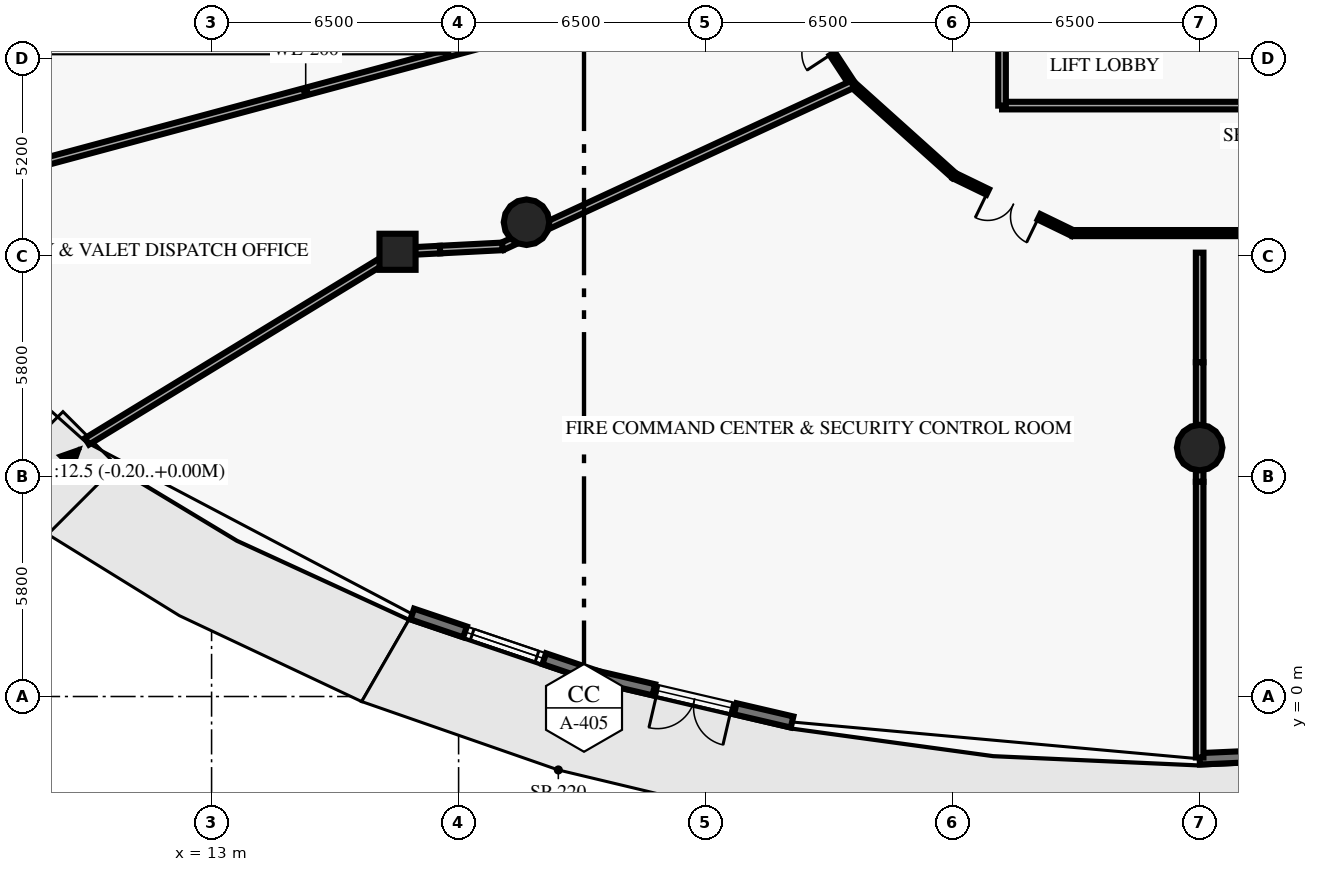
"""IFC4 building model, lengths in metres.
Left out: names, types, materials, properties, quantities, classifications, styles, units other than length and angle.
Written with IfcOpenShell. Run it as: python <this file> out.ifc"""

import sys

from ifc_helpers import new_model, si_unit, direction, frame, frame_2d, origin, origin_2d, place, context, subcontext, project, spatial, rectangle, circle, extrude, element, fill, save


model = new_model("IFC4")
c1 = context("Model", 3, precision=1e-05, world=origin(), true_north=direction((0.0, 1.0)))
c2 = subcontext(c1, "Body", "Model", "MODEL_VIEW")
j1 = project(units=[si_unit("LENGTHUNIT", "METRE"), si_unit("PLANEANGLEUNIT", "RADIAN")], contexts=[c1])
p1 = place(None, origin())
s1 = spatial("IfcSite", under=j1, at=p1, CompositionType="ELEMENT")
p2 = place(p1, origin())
s2 = spatial("IfcBuilding", under=s1, at=p2, CompositionType="ELEMENT")
p3 = place(p2, origin())
s3 = spatial("IfcBuildingStorey", under=s2, at=p3, CompositionType="ELEMENT", Elevation=0.0)
for number, where, z_axis, x_axis in (
    (1, (21.287, 12.481, 0.0), (0.0, 0.0, 1.0), (1.0, 0.0, 0.0)),
    (2, (39.0, 6.55, 0.0), (0.0, 0.0, 1.0), (1.0, 0.0, 0.0)),
):
    element("IfcColumn", number, at=place(p3, frame(where, z_axis=z_axis, x_axis=x_axis)), inside=s3, PredefinedType="COLUMN", context=c2, shape_type="SweptSolid", body=[
        extrude(circle(Radius=0.6, at=origin_2d()), origin(), (0.0, 0.0, 1.0), 5.7),
    ])
p4 = place(p3, frame((17.893, 11.703, 0.0), z_axis=(0.0, 0.0, 1.0), x_axis=(1.0, 0.0, 0.0)))
e3 = element("IfcColumn", 3, at=p4, inside=s3, PredefinedType="COLUMN", context=c2, shape_type="SweptSolid", body=[
    extrude(rectangle(XDim=0.95, YDim=0.95, at=origin_2d()), origin(), (0.0, 0.0, 1.0), 5.7),
])
p5 = place(p3, frame((23.142, 0.525, 0.0), z_axis=(0.0, 0.0, 1.0), x_axis=(-0.947251518608, 0.320491123895, 0.0)))
e4 = element("IfcWall", 4, at=p5, inside=s3, PredefinedType="STANDARD", context=c2, shape_type="SweptSolid", body=[
    extrude(rectangle(XDim=5.133, YDim=0.3, at=frame_2d((2.566, 0.0))), origin(), (0.0, 0.0, 1.0), 5.7),
])
p6 = place(p5, frame((1.666, 0.0, 0.9)))
e5 = element("IfcOpeningElement", 5, at=p6, cuts=e4, PredefinedType="OPENING", context=c2, shape_type="SweptSolid", body=[
    extrude(rectangle(XDim=1.8, YDim=2.4, at=frame_2d((0.9, 1.2))), frame((0.0, 0.16, 0.0), z_axis=(0.0, -1.0, 0.0), x_axis=(1.0, 0.0, 0.0)), (0.0, 0.0, 1.0), 0.32),
])
p7 = place(p5, frame((1.466, 0.0, 3.4)))
e6 = element("IfcOpeningElement", 6, at=p7, cuts=e4, PredefinedType="OPENING", context=c2, shape_type="SweptSolid", body=[
    extrude(rectangle(XDim=2.2, YDim=1.3, at=frame_2d((1.1, 0.65))), frame((0.0, 0.16, 0.0), z_axis=(0.0, -1.0, 0.0), x_axis=(1.0, 0.0, 0.0)), (0.0, 0.0, 1.0), 0.32),
])
p8 = place(p3, frame((28.275, -0.671, 0.0), z_axis=(0.0, 0.0, 1.0), x_axis=(-0.973919059094, 0.226895716868, 0.0)))
e7 = element("IfcWall", 7, at=p8, inside=s3, PredefinedType="STANDARD", context=c2, shape_type="SweptSolid", body=[
    extrude(rectangle(XDim=5.27, YDim=0.3, at=frame_2d((2.635, 0.0))), origin(), (0.0, 0.0, 1.0), 5.7),
])
p9 = place(p8, frame((1.635, 0.0, 0.0)))
e8 = element("IfcOpeningElement", 8, at=p9, cuts=e7, PredefinedType="OPENING", context=c2, shape_type="SweptSolid", body=[
    extrude(rectangle(XDim=2.0, YDim=2.4, at=frame_2d((1.0, 1.2))), frame((0.0, 0.16, 0.0), z_axis=(0.0, -1.0, 0.0), x_axis=(1.0, 0.0, 0.0)), (0.0, 0.0, 1.0), 0.32),
])
p10 = place(p8, frame((1.535, 0.0, 3.4)))
e9 = element("IfcOpeningElement", 9, at=p10, cuts=e7, PredefinedType="OPENING", context=c2, shape_type="SweptSolid", body=[
    extrude(rectangle(XDim=2.2, YDim=1.3, at=frame_2d((1.1, 0.65))), frame((0.0, 0.16, 0.0), z_axis=(0.0, -1.0, 0.0), x_axis=(1.0, 0.0, 0.0)), (0.0, 0.0, 1.0), 0.32),
])
p11 = place(p3, frame((44.409, -1.397, 0.0), z_axis=(0.0, 0.0, 1.0), x_axis=(-0.998993030562, -0.044865631479, 0.0)))
e10 = element("IfcWall", 10, at=p11, inside=s3, PredefinedType="STANDARD", context=c2, shape_type="SweptSolid", body=[
    extrude(rectangle(XDim=5.414, YDim=0.3, at=frame_2d((2.707, 0.0))), origin(), (0.0, 0.0, 1.0), 5.7),
])
p12 = place(p11, frame((1.807, 0.0, 0.9)))
e11 = element("IfcOpeningElement", 11, at=p12, cuts=e10, PredefinedType="OPENING", context=c2, shape_type="SweptSolid", body=[
    extrude(rectangle(XDim=1.8, YDim=2.4, at=frame_2d((0.9, 1.2))), frame((0.0, 0.16, 0.0), z_axis=(0.0, -1.0, 0.0), x_axis=(1.0, 0.0, 0.0)), (0.0, 0.0, 1.0), 0.32),
])
p13 = place(p11, frame((1.607, 0.0, 3.4)))
e12 = element("IfcOpeningElement", 12, at=p13, cuts=e10, PredefinedType="OPENING", context=c2, shape_type="SweptSolid", body=[
    extrude(rectangle(XDim=2.2, YDim=1.3, at=frame_2d((1.1, 0.65))), frame((0.0, 0.16, 0.0), z_axis=(0.0, -1.0, 0.0), x_axis=(1.0, 0.0, 0.0)), (0.0, 0.0, 1.0), 0.32),
])
p14 = place(p3, frame((33.8, 15.55, 0.0), z_axis=(0.0, 0.0, 1.0), x_axis=(1.0, 0.0, 0.0)))
e13 = element("IfcWall", 13, at=p14, inside=s3, PredefinedType="SOLIDWALL", context=c2, shape_type="SweptSolid", body=[
    extrude(rectangle(XDim=7.55, YDim=0.2, at=frame_2d((3.775, 0.0))), origin(), (0.0, 0.0, 1.0), 5.7),
])
p15 = place(p3, frame((33.8, 15.55, 0.0), z_axis=(0.0, 0.0, 1.0), x_axis=(0.0, 1.0, 0.0)))
e14 = element("IfcWall", 14, at=p15, inside=s3, PredefinedType="SOLIDWALL", context=c2, shape_type="SweptSolid", body=[
    extrude(rectangle(XDim=2.8, YDim=0.2, at=frame_2d((1.4, 0.0))), origin(), (0.0, 0.0, 1.0), 5.7),
])
p16 = place(p3, frame((29.864, 16.109, 0.0), z_axis=(0.0, 0.0, 1.0), x_axis=(-0.548318837904, 0.836269365694, 0.0)))
e15 = element("IfcWall", 15, at=p16, inside=s3, PredefinedType="PARTITIONING", context=c2, shape_type="SweptSolid", body=[
    extrude(rectangle(XDim=3.744, YDim=0.16, at=frame_2d((1.872, 0.0))), origin(), (0.0, 0.0, 1.0), 5.7),
])
p17 = place(p16, frame((0.969, 0.0, 0.0)))
e16 = element("IfcOpeningElement", 16, at=p17, cuts=e15, PredefinedType="OPENING", context=c2, shape_type="SweptSolid", body=[
    extrude(rectangle(XDim=1.6, YDim=2.2, at=frame_2d((0.8, 1.1))), frame((0.0, 0.09, 0.0), z_axis=(0.0, -1.0, 0.0), x_axis=(1.0, 0.0, 0.0)), (0.0, 0.0, 1.0), 0.18),
])
p18 = place(p3, frame((29.864, 16.109, 0.0), z_axis=(0.0, 0.0, 1.0), x_axis=(0.744066617248, -0.668105432621, 0.0)))
e17 = element("IfcWall", 17, at=p18, inside=s3, PredefinedType="PARTITIONING", context=c2, shape_type="SweptSolid", body=[
    extrude(rectangle(XDim=3.596, YDim=0.16, at=frame_2d((1.798, 0.0))), origin(), (0.0, 0.0, 1.0), 5.7),
])
p19 = place(p3, frame((35.656, 12.195, 0.0), z_axis=(0.0, 0.0, 1.0), x_axis=(-0.899789784655, 0.436323668199, 0.0)))
e18 = element("IfcWall", 18, at=p19, inside=s3, PredefinedType="PARTITIONING", context=c2, shape_type="SweptSolid", body=[
    extrude(rectangle(XDim=3.463, YDim=0.16, at=frame_2d((1.731, 0.0))), origin(), (0.0, 0.0, 1.0), 5.7),
])
p20 = place(p19, frame((0.982, 0.0, 0.0)))
e19 = element("IfcOpeningElement", 19, at=p20, cuts=e18, PredefinedType="OPENING", context=c2, shape_type="SweptSolid", body=[
    extrude(rectangle(XDim=1.5, YDim=2.2, at=frame_2d((0.75, 1.1))), frame((0.0, 0.09, 0.0), z_axis=(0.0, -1.0, 0.0), x_axis=(1.0, 0.0, 0.0)), (0.0, 0.0, 1.0), 0.18),
])
p21 = place(p3, frame((35.656, 12.195, 0.0), z_axis=(0.0, 0.0, 1.0), x_axis=(1.0, 0.0, 0.0)))
e20 = element("IfcWall", 20, at=p21, inside=s3, PredefinedType="PARTITIONING", context=c2, shape_type="SweptSolid", body=[
    extrude(rectangle(XDim=6.688, YDim=0.16, at=frame_2d((3.344, 0.0))), origin(), (0.0, 0.0, 1.0), 5.7),
])
p22 = place(p3, frame((27.811, 19.24, 0.0), z_axis=(0.0, 0.0, 1.0), x_axis=(-0.965611329509, -0.259989923505, 0.0)))
e21 = element("IfcWall", 21, at=p22, inside=s3, PredefinedType="SOLIDWALL", context=c2, shape_type="SweptSolid", body=[
    extrude(rectangle(XDim=25.548, YDim=0.2, at=frame_2d((12.774, 0.0))), origin(), (0.0, 0.0, 1.0), 5.7),
])
p23 = place(p3, frame((29.864, 16.109, 0.0), z_axis=(0.0, 0.0, 1.0), x_axis=(-0.907520382507, -0.420008041988, 0.0)))
e22 = element("IfcWall", 22, at=p23, inside=s3, PredefinedType="SOLIDWALL", context=c2, shape_type="SweptSolid", body=[
    extrude(rectangle(XDim=10.152, YDim=0.2, at=frame_2d((5.076, 0.0))), origin(), (0.0, 0.0, 1.0), 5.7),
])
p24 = place(p3, frame((20.651, 11.845, 0.0), z_axis=(0.0, 0.0, 1.0), x_axis=(-0.998692725363, -0.051115949639, 0.0)))
e23 = element("IfcWall", 23, at=p24, inside=s3, PredefinedType="SOLIDWALL", context=c2, shape_type="SweptSolid", body=[
    extrude(rectangle(XDim=1.643, YDim=0.2, at=frame_2d((0.822, 0.0))), origin(), (0.0, 0.0, 1.0), 5.7),
])
p25 = place(p3, frame((19.01, 11.761, 0.0), z_axis=(0.0, 0.0, 1.0), x_axis=(-0.998649603439, -0.051951607785, 0.0)))
e24 = element("IfcWall", 24, at=p25, inside=s3, PredefinedType="SOLIDWALL", context=c2, shape_type="SweptSolid", body=[
    extrude(rectangle(XDim=1.118, YDim=0.2, at=frame_2d((0.559, 0.0))), origin(), (0.0, 0.0, 1.0), 5.24),
])
p26 = place(p3, frame((17.893, 11.703, 0.0), z_axis=(0.0, 0.0, 1.0), x_axis=(-0.853545862143, -0.5210177168, 0.0)))
e25 = element("IfcWall", 25, at=p26, inside=s3, PredefinedType="SOLIDWALL", context=c2, shape_type="SweptSolid", body=[
    extrude(rectangle(XDim=9.573, YDim=0.2, at=frame_2d((4.787, 0.0))), origin(), (0.0, 0.0, 1.0), 5.7),
])
p27 = place(p3, frame((39.0, 11.68, 0.0), z_axis=(0.0, 0.0, 1.0), x_axis=(0.0, -1.0, 0.0)))
e26 = element("IfcWall", 26, at=p27, inside=s3, PredefinedType="PARTITIONING", context=c2, shape_type="SweptSolid", body=[
    extrude(rectangle(XDim=2.885, YDim=0.2, at=frame_2d((1.442, 0.0))), origin(), (0.0, 0.0, 1.0), 5.7),
])
p28 = place(p3, frame((39.0, 8.795, 0.0), z_axis=(0.0, 0.0, 1.0), x_axis=(0.0, -1.0, 0.0)))
e27 = element("IfcWall", 27, at=p28, inside=s3, PredefinedType="PARTITIONING", context=c2, shape_type="SweptSolid", body=[
    extrude(rectangle(XDim=2.259, YDim=0.2, at=frame_2d((1.129, 0.0))), origin(), (0.0, 0.0, 1.0), 4.765),
])
p29 = place(p3, frame((39.0, 6.536, 0.0), z_axis=(0.0, 0.0, 1.0), x_axis=(0.0, -1.0, 0.0)))
e28 = element("IfcWall", 28, at=p29, inside=s3, PredefinedType="PARTITIONING", context=c2, shape_type="SweptSolid", body=[
    extrude(rectangle(XDim=0.886, YDim=0.2, at=frame_2d((0.443, 0.0))), origin(), (0.0, 0.0, 1.0), 5.7),
])
p30 = place(p3, frame((39.0, 5.65, 0.0), z_axis=(0.0, 0.0, 1.0), x_axis=(0.0, -1.0, 0.0)))
e29 = element("IfcWall", 29, at=p30, inside=s3, PredefinedType="PARTITIONING", context=c2, shape_type="SweptSolid", body=[
    extrude(rectangle(XDim=7.255, YDim=0.2, at=frame_2d((3.627, 0.0))), origin(), (0.0, 0.0, 1.0), 5.7),
])
p31 = place(p6, origin())
e30 = element("IfcWindow", 30, at=p31, inside=s3, PartitioningType="DOUBLE_PANEL_VERTICAL", PredefinedType="WINDOW", context=c2, shape_type="SweptSolid", body=[
    extrude(rectangle(XDim=1.8, YDim=2.4, at=frame_2d((0.9, 1.2))), frame((0.0, 0.03, 0.0), z_axis=(0.0, -1.0, 0.0), x_axis=(1.0, 0.0, 0.0)), (0.0, 0.0, 1.0), 0.06),
])
fill(e5, e30)
p32 = place(p7, origin())
e31 = element("IfcWindow", 31, at=p32, inside=s3, PartitioningType="DOUBLE_PANEL_HORIZONTAL", PredefinedType="WINDOW", context=c2, shape_type="SweptSolid", body=[
    extrude(rectangle(XDim=2.2, YDim=1.3, at=frame_2d((1.1, 0.65))), frame((0.0, 0.03, 0.0), z_axis=(0.0, -1.0, 0.0), x_axis=(1.0, 0.0, 0.0)), (0.0, 0.0, 1.0), 0.06),
])
fill(e6, e31)
p33 = place(p9, origin())
e32 = element("IfcDoor", 32, at=p33, inside=s3, OperationType="DOUBLE_DOOR_SINGLE_SWING", PredefinedType="DOOR", context=c2, shape_type="SweptSolid", body=[
    extrude(rectangle(XDim=2.0, YDim=2.4, at=frame_2d((1.0, 1.2))), frame((0.0, 0.025, 0.0), z_axis=(0.0, -1.0, 0.0), x_axis=(1.0, 0.0, 0.0)), (0.0, 0.0, 1.0), 0.05),
])
fill(e8, e32)
p34 = place(p10, origin())
e33 = element("IfcWindow", 33, at=p34, inside=s3, PartitioningType="DOUBLE_PANEL_HORIZONTAL", PredefinedType="WINDOW", context=c2, shape_type="SweptSolid", body=[
    extrude(rectangle(XDim=2.2, YDim=1.3, at=frame_2d((1.1, 0.65))), frame((0.0, 0.03, 0.0), z_axis=(0.0, -1.0, 0.0), x_axis=(1.0, 0.0, 0.0)), (0.0, 0.0, 1.0), 0.06),
])
fill(e9, e33)
p35 = place(p17, origin())
e34 = element("IfcDoor", 34, at=p35, inside=s3, OperationType="DOUBLE_DOOR_SINGLE_SWING", PredefinedType="DOOR", context=c2, shape_type="SweptSolid", body=[
    extrude(rectangle(XDim=1.6, YDim=2.2, at=frame_2d((0.8, 1.1))), frame((0.0, 0.025, 0.0), z_axis=(0.0, -1.0, 0.0), x_axis=(1.0, 0.0, 0.0)), (0.0, 0.0, 1.0), 0.05),
])
fill(e16, e34)
p36 = place(p20, origin())
e35 = element("IfcDoor", 35, at=p36, inside=s3, OperationType="DOUBLE_DOOR_SINGLE_SWING", PredefinedType="DOOR", context=c2, shape_type="SweptSolid", body=[
    extrude(rectangle(XDim=1.5, YDim=2.2, at=frame_2d((0.75, 1.1))), frame((0.0, 0.025, 0.0), z_axis=(0.0, -1.0, 0.0), x_axis=(1.0, 0.0, 0.0)), (0.0, 0.0, 1.0), 0.05),
])
fill(e19, e35)
save(model, sys.argv[1])
